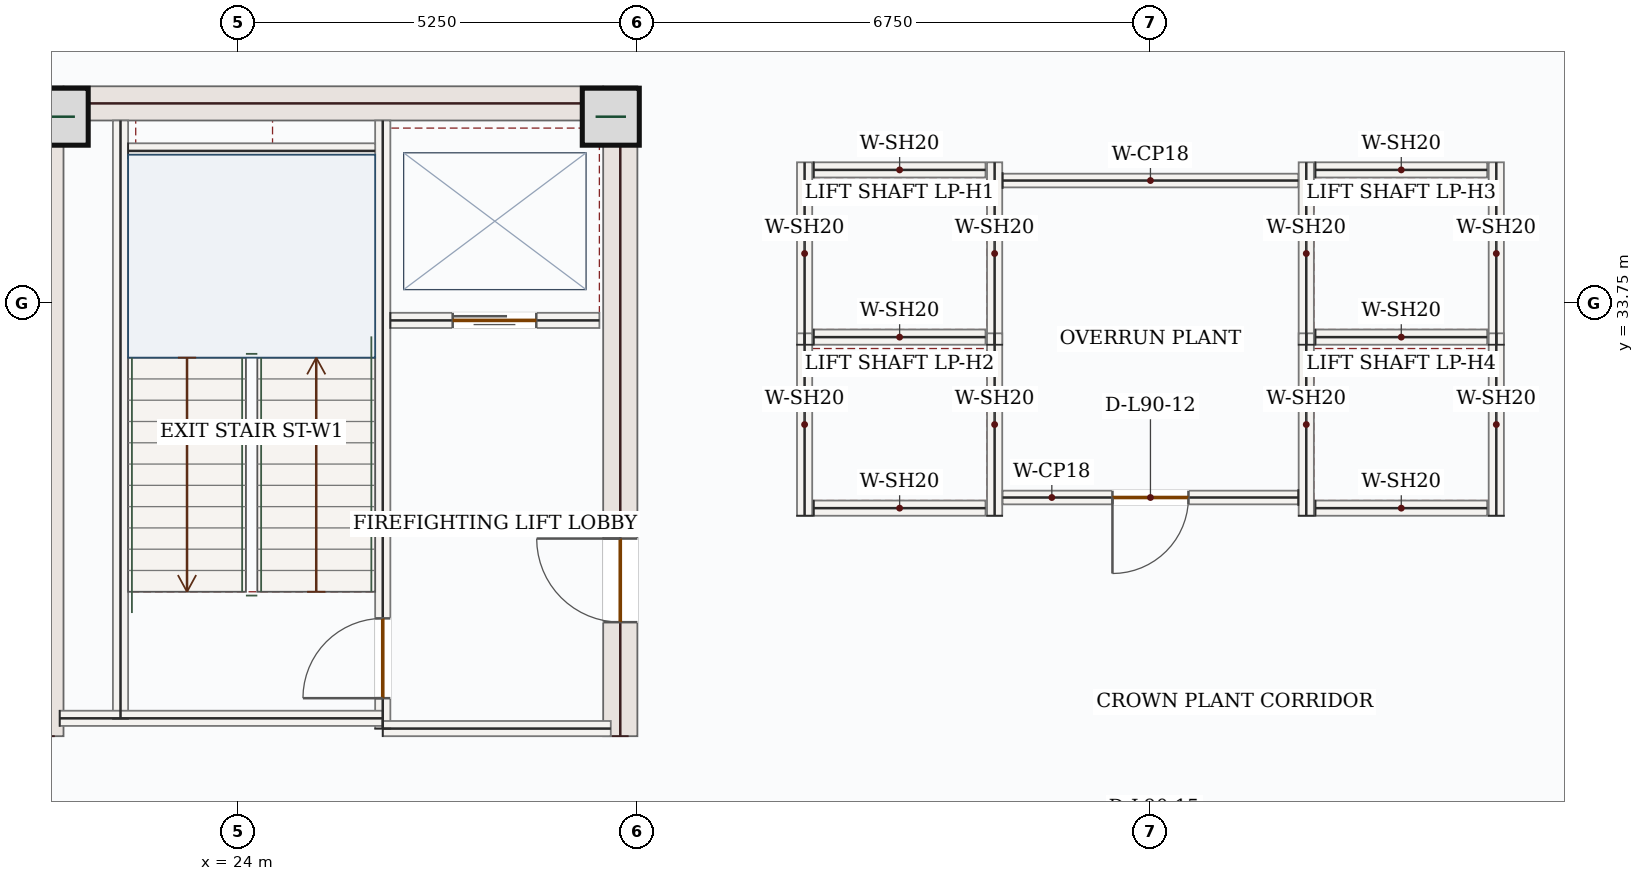
"""IFC4 building model, lengths in metres.
Left out: names, types, materials, properties, quantities, classifications, styles, units other than length and angle.
Written with IfcOpenShell. Run it as: python <this file> out.ifc"""

import sys

from ifc_helpers import new_model, si_unit, direction, frame, frame_2d, origin, origin_2d, place, context, subcontext, project, spatial, rectangle, extrude, source, transform, mapped, element, fill, save


model = new_model("IFC4")
c1 = context("Model", 3, precision=1e-05, world=origin(), true_north=direction((0.0, 1.0)))
c2 = subcontext(c1, "Body", "Model", "MODEL_VIEW")
j1 = project(units=[si_unit("LENGTHUNIT", "METRE"), si_unit("PLANEANGLEUNIT", "RADIAN")], contexts=[c1])
p1 = place(None, origin())
s1 = spatial("IfcSite", under=j1, at=p1, CompositionType="ELEMENT")
p2 = place(p1, origin())
s2 = spatial("IfcBuilding", under=s1, at=p2, CompositionType="ELEMENT")
p3 = place(p2, frame((0.0, 0.0, 370.65)))
s3 = spatial("IfcBuildingStorey", under=s2, at=p3, CompositionType="ELEMENT", Elevation=370.65)
m1 = source(origin(), c2, "Body", "SweptSolid", [
    extrude(rectangle(XDim=8.55, YDim=0.45, at=frame_2d((4.275, 0.0))), origin(), (0.0, 0.0, 1.0), 4.25),
])
p4 = place(p3, frame((21.475, 28.05, 0.0), z_axis=(0.0, 0.0, 1.0), x_axis=(0.0, 1.0, 0.0)))
e1 = element("IfcWall", 1, at=p4, inside=s3, PredefinedType="SHEAR", context=c2, shape_type="MappedRepresentation", body=[
    mapped(m1, transform((0.0, 0.0, 0.0), x_axis=(1.0, 0.0, 0.0), y_axis=(0.0, 1.0, 0.0), z_axis=(0.0, 0.0, 1.0), scale=1.0)),
])
p5 = place(p3, frame((29.025, 28.05, 0.0), z_axis=(0.0, 0.0, 1.0), x_axis=(0.0, 1.0, 0.0)))
e2 = element("IfcWall", 2, at=p5, inside=s3, PredefinedType="SHEAR", context=c2, shape_type="SweptSolid", body=[
    extrude(rectangle(XDim=8.55, YDim=0.45, at=frame_2d((4.275, 0.0))), origin(), (0.0, 0.0, 1.0), 4.25),
])
p6 = place(p5, frame((1.5, 0.0, 0.0)))
e3 = element("IfcOpeningElement", 3, at=p6, cuts=e2, PredefinedType="OPENING", context=c2, shape_type="SweptSolid", body=[
    extrude(rectangle(XDim=1.1, YDim=2.2, at=frame_2d((0.55, 1.1))), frame((0.0, 0.235, 0.0), z_axis=(0.0, -1.0, 0.0), x_axis=(1.0, 0.0, 0.0)), (0.0, 0.0, 1.0), 0.47),
])
m2 = source(origin(), c2, "Body", "SweptSolid", [
    extrude(rectangle(XDim=7.1, YDim=0.45, at=frame_2d((3.55, 0.0))), origin(), (0.0, 0.0, 1.0), 4.25),
])
p7 = place(p3, frame((21.7, 36.375, 0.0), z_axis=(0.0, 0.0, 1.0), x_axis=(1.0, 0.0, 0.0)))
e4 = element("IfcWall", 4, at=p7, inside=s3, PredefinedType="SHEAR", context=c2, shape_type="MappedRepresentation", body=[
    mapped(m2, transform((0.0, 0.0, 0.0), x_axis=(1.0, 0.0, 0.0), y_axis=(0.0, 1.0, 0.0), z_axis=(0.0, 0.0, 1.0), scale=1.0)),
])
m3 = source(origin(), c2, "Body", "SweptSolid", [
    extrude(rectangle(XDim=0.75, YDim=0.75, at=origin_2d()), origin(), (0.0, 0.0, 1.0), 4.5),
])
for number, where, z_axis, x_axis in (
    (5, (21.65, 36.2, 0.0), (0.0, 0.0, 1.0), (1.0, 0.0, 0.0)),
    (6, (28.9, 36.2, 0.0), (0.0, 0.0, 1.0), (1.0, 0.0, 0.0)),
):
    element("IfcColumn", number, at=place(p3, frame(where, z_axis=z_axis, x_axis=x_axis)), inside=s3, PredefinedType="COLUMN", context=c2, shape_type="MappedRepresentation", body=[
        mapped(m3, transform((0.0, 0.0, 0.0), x_axis=(1.0, 0.0, 0.0), y_axis=(0.0, 1.0, 0.0), z_axis=(0.0, 0.0, 1.0), scale=1.0)),
    ])
m4 = source(origin(), c2, "Body", "SweptSolid", [
    extrude(rectangle(XDim=5.258, YDim=0.26, at=frame_2d((2.629, 0.0))), origin(), (0.0, 0.0, 1.0), 4.25),
])
p8 = place(p3, frame((18.94, 35.542, 0.0), z_axis=(0.0, 0.0, 1.0), x_axis=(0.707106781187, 0.707106781187, 0.0)))
e7 = element("IfcWall", 7, at=p8, inside=s3, PredefinedType="SOLIDWALL", context=c2, shape_type="MappedRepresentation", body=[
    mapped(m4, transform((0.0, 0.0, 0.0), x_axis=(1.0, 0.0, 0.0), y_axis=(0.0, 1.0, 0.0), z_axis=(0.0, 0.0, 1.0), scale=1.0)),
])
m5 = source(origin(), c2, "Body", "SweptSolid", [
    extrude(rectangle(XDim=7.87, YDim=0.2, at=frame_2d((3.935, 0.0))), origin(), (0.0, 0.0, 1.0), 4.25),
])
p9 = place(p3, frame((22.45, 28.28, 0.0), z_axis=(0.0, 0.0, 1.0), x_axis=(0.0, 1.0, 0.0)))
e8 = element("IfcWall", 8, at=p9, inside=s3, PredefinedType="SOLIDWALL", context=c2, shape_type="MappedRepresentation", body=[
    mapped(m5, transform((0.0, 0.0, 0.0), x_axis=(1.0, 0.0, 0.0), y_axis=(0.0, 1.0, 0.0), z_axis=(0.0, 0.0, 1.0), scale=1.0)),
])
p10 = place(p3, frame((25.9, 28.15, 0.0), z_axis=(0.0, 0.0, 1.0), x_axis=(0.0, 1.0, 0.0)))
e9 = element("IfcWall", 9, at=p10, inside=s3, PredefinedType="SOLIDWALL", context=c2, shape_type="SweptSolid", body=[
    extrude(rectangle(XDim=8.0, YDim=0.2, at=frame_2d((4.0, 0.0))), origin(), (0.0, 0.0, 1.0), 4.25),
])
p11 = place(p10, frame((0.4, 0.0, 0.0)))
e10 = element("IfcOpeningElement", 10, at=p11, cuts=e9, PredefinedType="OPENING", context=c2, shape_type="SweptSolid", body=[
    extrude(rectangle(XDim=1.05, YDim=2.15, at=frame_2d((0.525, 1.075))), frame((0.0, 0.11, 0.0), z_axis=(0.0, -1.0, 0.0), x_axis=(1.0, 0.0, 0.0)), (0.0, 0.0, 1.0), 0.22),
])
m6 = source(origin(), c2, "Body", "SweptSolid", [
    extrude(rectangle(XDim=4.25, YDim=0.2, at=frame_2d((2.125, 0.0))), origin(), (0.0, 0.0, 1.0), 4.25),
])
p12 = place(p3, frame((21.65, 28.285, 0.0), z_axis=(0.0, 0.0, 1.0), x_axis=(1.0, 0.0, 0.0)))
e11 = element("IfcWall", 11, at=p12, inside=s3, PredefinedType="SOLIDWALL", context=c2, shape_type="MappedRepresentation", body=[
    mapped(m6, transform((0.0, 0.0, 0.0), x_axis=(1.0, 0.0, 0.0), y_axis=(0.0, 1.0, 0.0), z_axis=(0.0, 0.0, 1.0), scale=1.0)),
])
m7 = source(origin(), c2, "Body", "SweptSolid", [
    extrude(rectangle(XDim=3.0, YDim=0.2, at=frame_2d((1.5, 0.0))), origin(), (0.0, 0.0, 1.0), 4.25),
])
p13 = place(p3, frame((25.9, 28.15, 0.0), z_axis=(0.0, 0.0, 1.0), x_axis=(1.0, 0.0, 0.0)))
e12 = element("IfcWall", 12, at=p13, inside=s3, PredefinedType="SOLIDWALL", context=c2, shape_type="MappedRepresentation", body=[
    mapped(m7, transform((0.0, 0.0, 0.0), x_axis=(1.0, 0.0, 0.0), y_axis=(0.0, 1.0, 0.0), z_axis=(0.0, 0.0, 1.0), scale=1.0)),
])
m8 = source(origin(), c2, "Body", "SweptSolid", [
    extrude(rectangle(XDim=3.25, YDim=0.2, at=frame_2d((1.625, 0.0))), origin(), (0.0, 0.0, 1.0), 4.25),
])
p14 = place(p3, frame((22.55, 35.75, 0.0), z_axis=(0.0, 0.0, 1.0), x_axis=(1.0, 0.0, 0.0)))
e13 = element("IfcWall", 13, at=p14, inside=s3, PredefinedType="SOLIDWALL", context=c2, shape_type="MappedRepresentation", body=[
    mapped(m8, transform((0.0, 0.0, 0.0), x_axis=(1.0, 0.0, 0.0), y_axis=(0.0, 1.0, 0.0), z_axis=(0.0, 0.0, 1.0), scale=1.0)),
])
p15 = place(p3, frame((26.0, 33.52, 0.0), z_axis=(0.0, 0.0, 1.0), x_axis=(1.0, 0.0, 0.0)))
e14 = element("IfcWall", 14, at=p15, inside=s3, PredefinedType="SOLIDWALL", context=c2, shape_type="SweptSolid", body=[
    extrude(rectangle(XDim=2.75, YDim=0.2, at=frame_2d((1.375, 0.0))), origin(), (0.0, 0.0, 1.0), 4.25),
])
p16 = place(p15, frame((0.82, 0.0, 0.0)))
e15 = element("IfcOpeningElement", 15, at=p16, cuts=e14, PredefinedType="OPENING", context=c2, shape_type="SweptSolid", body=[
    extrude(rectangle(XDim=1.1, YDim=2.15, at=frame_2d((0.55, 1.075))), frame((0.0, 0.11, 0.0), z_axis=(0.0, -1.0, 0.0), x_axis=(1.0, 0.0, 0.0)), (0.0, 0.0, 1.0), 0.22),
])
m9 = source(origin(), c2, "Body", "SweptSolid", [
    extrude(rectangle(XDim=2.4, YDim=0.2, at=frame_2d((1.2, 0.0))), origin(), (0.0, 0.0, 1.0), 4.25),
])
for number, where, z_axis, x_axis in (
    (16, (31.45, 33.2, 0.0), (0.0, 0.0, 1.0), (0.0, 1.0, 0.0)),
    (17, (33.95, 33.2, 0.0), (0.0, 0.0, 1.0), (0.0, 1.0, 0.0)),
):
    element("IfcWall", number, at=place(p3, frame(where, z_axis=z_axis, x_axis=x_axis)), inside=s3, PredefinedType="SOLIDWALL", context=c2, shape_type="MappedRepresentation", body=[
        mapped(m9, transform((0.0, 0.0, 0.0), x_axis=(1.0, 0.0, 0.0), y_axis=(0.0, 1.0, 0.0), z_axis=(0.0, 0.0, 1.0), scale=1.0)),
    ])
m10 = source(origin(), c2, "Body", "SweptSolid", [
    extrude(rectangle(XDim=2.26, YDim=0.2, at=frame_2d((1.13, 0.0))), origin(), (0.0, 0.0, 1.0), 4.25),
])
for number, where, z_axis, x_axis in (
    (18, (31.57, 33.3, 0.0), (0.0, 0.0, 1.0), (1.0, 0.0, 0.0)),
    (19, (31.57, 35.5, 0.0), (0.0, 0.0, 1.0), (1.0, 0.0, 0.0)),
):
    element("IfcWall", number, at=place(p3, frame(where, z_axis=z_axis, x_axis=x_axis)), inside=s3, PredefinedType="SOLIDWALL", context=c2, shape_type="MappedRepresentation", body=[
        mapped(m10, transform((0.0, 0.0, 0.0), x_axis=(1.0, 0.0, 0.0), y_axis=(0.0, 1.0, 0.0), z_axis=(0.0, 0.0, 1.0), scale=1.0)),
    ])
for number, where, z_axis, x_axis in (
    (20, (31.45, 30.95, 0.0), (0.0, 0.0, 1.0), (0.0, 1.0, 0.0)),
    (21, (33.95, 30.95, 0.0), (0.0, 0.0, 1.0), (0.0, 1.0, 0.0)),
):
    element("IfcWall", number, at=place(p3, frame(where, z_axis=z_axis, x_axis=x_axis)), inside=s3, PredefinedType="SOLIDWALL", context=c2, shape_type="MappedRepresentation", body=[
        mapped(m9, transform((0.0, 0.0, 0.0), x_axis=(1.0, 0.0, 0.0), y_axis=(0.0, 1.0, 0.0), z_axis=(0.0, 0.0, 1.0), scale=1.0)),
    ])
p17 = place(p3, frame((31.57, 31.05, 0.0), z_axis=(0.0, 0.0, 1.0), x_axis=(1.0, 0.0, 0.0)))
e22 = element("IfcWall", 22, at=p17, inside=s3, PredefinedType="SOLIDWALL", context=c2, shape_type="MappedRepresentation", body=[
    mapped(m10, transform((0.0, 0.0, 0.0), x_axis=(1.0, 0.0, 0.0), y_axis=(0.0, 1.0, 0.0), z_axis=(0.0, 0.0, 1.0), scale=1.0)),
])
for number, where, z_axis, x_axis in (
    (23, (38.05, 33.2, 0.0), (0.0, 0.0, 1.0), (0.0, 1.0, 0.0)),
    (24, (40.55, 33.2, 0.0), (0.0, 0.0, 1.0), (0.0, 1.0, 0.0)),
):
    element("IfcWall", number, at=place(p3, frame(where, z_axis=z_axis, x_axis=x_axis)), inside=s3, PredefinedType="SOLIDWALL", context=c2, shape_type="MappedRepresentation", body=[
        mapped(m9, transform((0.0, 0.0, 0.0), x_axis=(1.0, 0.0, 0.0), y_axis=(0.0, 1.0, 0.0), z_axis=(0.0, 0.0, 1.0), scale=1.0)),
    ])
for number, where, z_axis, x_axis in (
    (25, (38.17, 33.3, 0.0), (0.0, 0.0, 1.0), (1.0, 0.0, 0.0)),
    (26, (38.17, 35.5, 0.0), (0.0, 0.0, 1.0), (1.0, 0.0, 0.0)),
):
    element("IfcWall", number, at=place(p3, frame(where, z_axis=z_axis, x_axis=x_axis)), inside=s3, PredefinedType="SOLIDWALL", context=c2, shape_type="MappedRepresentation", body=[
        mapped(m10, transform((0.0, 0.0, 0.0), x_axis=(1.0, 0.0, 0.0), y_axis=(0.0, 1.0, 0.0), z_axis=(0.0, 0.0, 1.0), scale=1.0)),
    ])
for number, where, z_axis, x_axis in (
    (27, (38.05, 30.95, 0.0), (0.0, 0.0, 1.0), (0.0, 1.0, 0.0)),
    (28, (40.55, 30.95, 0.0), (0.0, 0.0, 1.0), (0.0, 1.0, 0.0)),
):
    element("IfcWall", number, at=place(p3, frame(where, z_axis=z_axis, x_axis=x_axis)), inside=s3, PredefinedType="SOLIDWALL", context=c2, shape_type="MappedRepresentation", body=[
        mapped(m9, transform((0.0, 0.0, 0.0), x_axis=(1.0, 0.0, 0.0), y_axis=(0.0, 1.0, 0.0), z_axis=(0.0, 0.0, 1.0), scale=1.0)),
    ])
p18 = place(p3, frame((38.17, 31.05, 0.0), z_axis=(0.0, 0.0, 1.0), x_axis=(1.0, 0.0, 0.0)))
e29 = element("IfcWall", 29, at=p18, inside=s3, PredefinedType="SOLIDWALL", context=c2, shape_type="MappedRepresentation", body=[
    mapped(m10, transform((0.0, 0.0, 0.0), x_axis=(1.0, 0.0, 0.0), y_axis=(0.0, 1.0, 0.0), z_axis=(0.0, 0.0, 1.0), scale=1.0)),
])
m11 = source(origin(), c2, "Body", "SweptSolid", [
    extrude(rectangle(XDim=3.89, YDim=0.18, at=frame_2d((1.945, 0.0))), origin(), (0.0, 0.0, 1.0), 4.25),
])
p19 = place(p3, frame((34.055, 35.36, 0.0), z_axis=(0.0, 0.0, 1.0), x_axis=(1.0, 0.0, 0.0)))
e30 = element("IfcWall", 30, at=p19, inside=s3, PredefinedType="PARTITIONING", context=c2, shape_type="MappedRepresentation", body=[
    mapped(m11, transform((0.0, 0.0, 0.0), x_axis=(1.0, 0.0, 0.0), y_axis=(0.0, 1.0, 0.0), z_axis=(0.0, 0.0, 1.0), scale=1.0)),
])
p20 = place(p3, frame((37.945, 31.19, 0.0), z_axis=(0.0, 0.0, 1.0), x_axis=(-1.0, 0.0, 0.0)))
e31 = element("IfcWall", 31, at=p20, inside=s3, PredefinedType="PARTITIONING", context=c2, shape_type="SweptSolid", body=[
    extrude(rectangle(XDim=3.89, YDim=0.18, at=frame_2d((1.945, 0.0))), origin(), (0.0, 0.0, 1.0), 4.25),
])
p21 = place(p20, frame((1.445, 0.0, 0.0)))
e32 = element("IfcOpeningElement", 32, at=p21, cuts=e31, PredefinedType="OPENING", context=c2, shape_type="SweptSolid", body=[
    extrude(rectangle(XDim=1.0, YDim=2.15, at=frame_2d((0.5, 1.075))), frame((0.0, 0.1, 0.0), z_axis=(0.0, -1.0, 0.0), x_axis=(1.0, 0.0, 0.0)), (0.0, 0.0, 1.0), 0.2),
])
m12 = source(origin(), c2, "Body", "SweptSolid", [
    extrude(rectangle(XDim=1.05, YDim=2.15, at=frame_2d((0.525, 1.075))), frame((0.0, 0.025, 0.0), z_axis=(0.0, -1.0, 0.0), x_axis=(1.0, 0.0, 0.0)), (0.0, 0.0, 1.0), 0.05),
])
p22 = place(p11, origin())
e33 = element("IfcDoor", 33, at=p22, inside=s3, OperationType="SINGLE_SWING_LEFT", PredefinedType="DOOR", context=c2, shape_type="MappedRepresentation", body=[
    mapped(m12, transform((0.0, 0.0, 0.0), x_axis=(1.0, 0.0, 0.0), y_axis=(0.0, 1.0, 0.0), z_axis=(0.0, 0.0, 1.0), scale=1.0)),
])
fill(e10, e33)
m13 = source(origin(), c2, "Body", "SweptSolid", [
    extrude(rectangle(XDim=1.1, YDim=2.15, at=frame_2d((0.55, 1.075))), frame((0.0, 0.025, 0.0), z_axis=(0.0, -1.0, 0.0), x_axis=(1.0, 0.0, 0.0)), (0.0, 0.0, 1.0), 0.05),
])
p23 = place(p16, origin())
e34 = element("IfcDoor", 34, at=p23, inside=s3, OperationType="DOUBLE_DOOR_SLIDING", PredefinedType="DOOR", context=c2, shape_type="MappedRepresentation", body=[
    mapped(m13, transform((0.0, 0.0, 0.0), x_axis=(1.0, 0.0, 0.0), y_axis=(0.0, 1.0, 0.0), z_axis=(0.0, 0.0, 1.0), scale=1.0)),
])
fill(e15, e34)
m14 = source(origin(), c2, "Body", "SweptSolid", [
    extrude(rectangle(XDim=1.1, YDim=2.2, at=frame_2d((0.55, 1.1))), frame((0.0, 0.025, 0.0), z_axis=(0.0, -1.0, 0.0), x_axis=(1.0, 0.0, 0.0)), (0.0, 0.0, 1.0), 0.05),
])
p24 = place(p6, origin())
e35 = element("IfcDoor", 35, at=p24, inside=s3, OperationType="SINGLE_SWING_RIGHT", PredefinedType="DOOR", context=c2, shape_type="MappedRepresentation", body=[
    mapped(m14, transform((0.0, 0.0, 0.0), x_axis=(1.0, 0.0, 0.0), y_axis=(0.0, 1.0, 0.0), z_axis=(0.0, 0.0, 1.0), scale=1.0)),
])
fill(e3, e35)
m15 = source(origin(), c2, "Body", "SweptSolid", [
    extrude(rectangle(XDim=1.0, YDim=2.15, at=frame_2d((0.5, 1.075))), frame((0.0, 0.025, 0.0), z_axis=(0.0, -1.0, 0.0), x_axis=(1.0, 0.0, 0.0)), (0.0, 0.0, 1.0), 0.05),
])
p25 = place(p21, origin())
e36 = element("IfcDoor", 36, at=p25, inside=s3, OperationType="SINGLE_SWING_RIGHT", PredefinedType="DOOR", context=c2, shape_type="MappedRepresentation", body=[
    mapped(m15, transform((0.0, 0.0, 0.0), x_axis=(1.0, 0.0, 0.0), y_axis=(0.0, 1.0, 0.0), z_axis=(0.0, 0.0, 1.0), scale=1.0)),
])
fill(e32, e36)
save(model, sys.argv[1])
